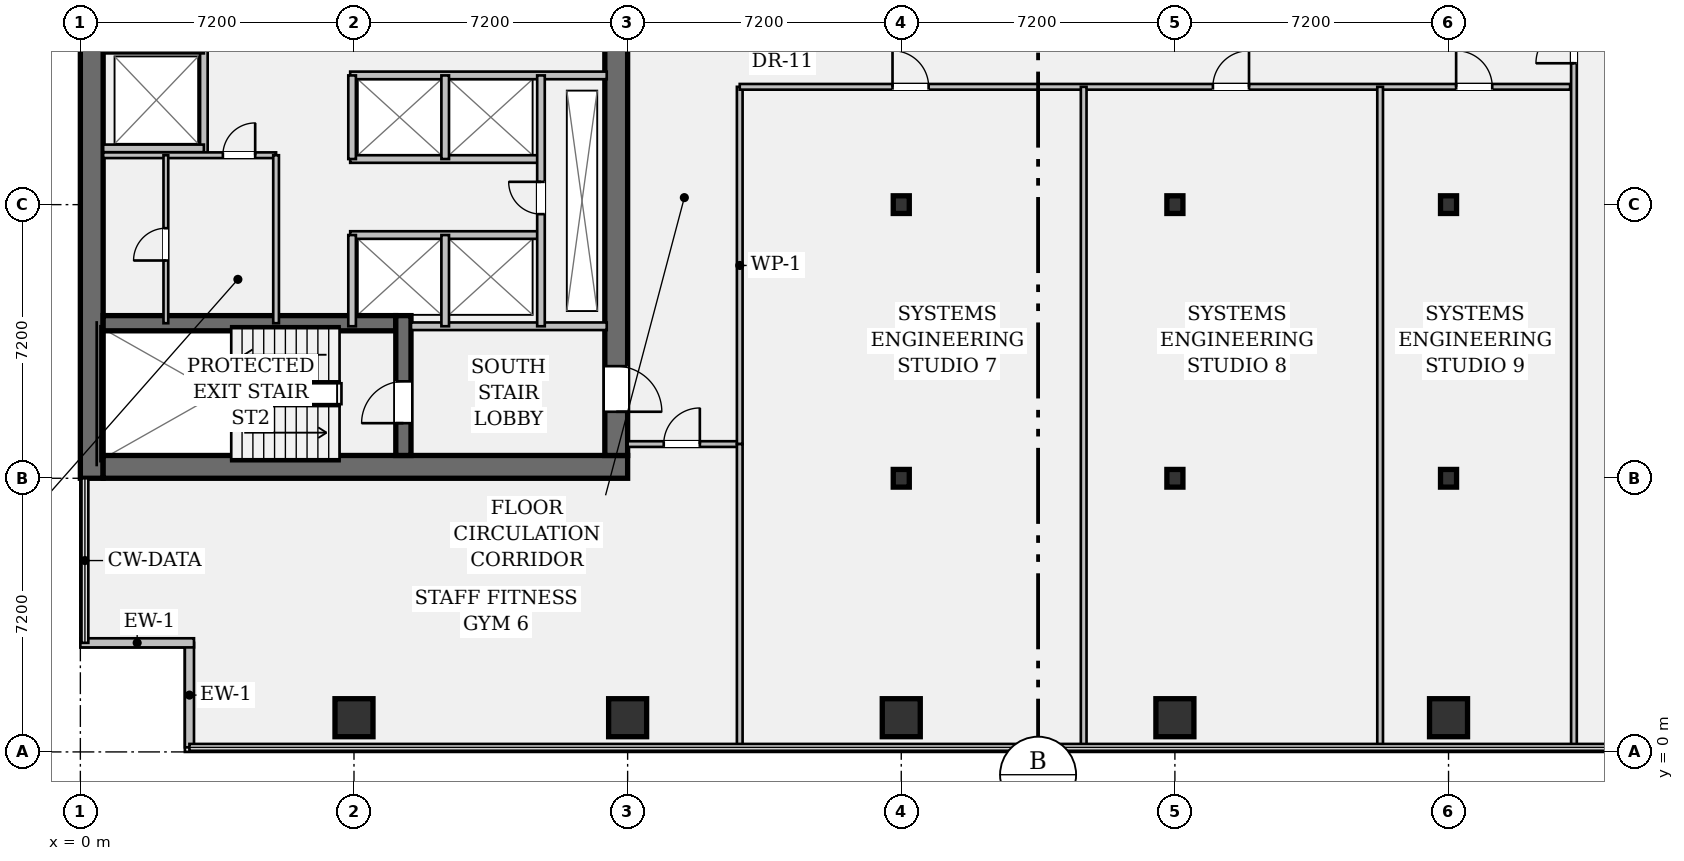
"""IFC4 building model, lengths in metres.
Left out: names, types, materials, properties, quantities, classifications, styles, units other than length and angle.
Written with IfcOpenShell. Run it as: python <this file> out.ifc"""

import sys

from ifc_helpers import new_model, si_unit, direction, frame, frame_2d, origin, origin_2d, place, context, subcontext, project, spatial, rectangle, hollow_rectangle, i_section, extrude, element, fill, save


model = new_model("IFC4")
c1 = context("Model", 3, precision=1e-05, world=origin(), true_north=direction((0.0, 1.0)))
c2 = subcontext(c1, "Body", "Model", "MODEL_VIEW")
j1 = project(units=[si_unit("LENGTHUNIT", "METRE"), si_unit("PLANEANGLEUNIT", "RADIAN")], contexts=[c1])
p1 = place(None, origin())
s1 = spatial("IfcSite", under=j1, at=p1, CompositionType="ELEMENT")
p2 = place(p1, origin())
s2 = spatial("IfcBuilding", under=s1, at=p2, CompositionType="ELEMENT")
p3 = place(p2, frame((0.0, 0.0, 69.65)))
s3 = spatial("IfcBuildingStorey", under=s2, at=p3, CompositionType="ELEMENT", Elevation=69.65)
p4 = place(p3, frame((0.3, 7.2, 0.0), z_axis=(0.0, 0.0, 1.0), x_axis=(0.0, 1.0, 0.0)))
e1 = element("IfcWall", 1, at=p4, inside=s3, PredefinedType="SHEAR", context=c2, shape_type="SweptSolid", body=[
    extrude(rectangle(XDim=28.8, YDim=0.6, at=frame_2d((14.4, 0.0))), origin(), (0.0, 0.0, 1.0), 3.57),
])
p5 = place(p3, frame((0.6, 7.5, 0.0), z_axis=(0.0, 0.0, 1.0), x_axis=(1.0, 0.0, 0.0)))
e2 = element("IfcWall", 2, at=p5, inside=s3, PredefinedType="SHEAR", context=c2, shape_type="SweptSolid", body=[
    extrude(rectangle(XDim=13.8, YDim=0.6, at=frame_2d((6.9, 0.0))), origin(), (0.0, 0.0, 1.0), 3.57),
])
p6 = place(p3, frame((14.1, 35.4, 0.0), z_axis=(0.0, 0.0, 1.0), x_axis=(0.0, -1.0, 0.0)))
e3 = element("IfcWall", 3, at=p6, inside=s3, PredefinedType="SHEAR", context=c2, shape_type="SweptSolid", body=[
    extrude(rectangle(XDim=27.6, YDim=0.6, at=frame_2d((13.8, 0.0))), origin(), (0.0, 0.0, 1.0), 3.57),
])
p7 = place(p6, frame((1.3, 0.0, 0.0)))
e4 = element("IfcOpeningElement", 4, at=p7, cuts=e3, PredefinedType="OPENING", context=c2, shape_type="SweptSolid", body=[
    extrude(rectangle(XDim=1.2, YDim=2.15, at=frame_2d((0.6, 1.075))), frame((0.0, 0.312, 0.0), z_axis=(0.0, -1.0, 0.0), x_axis=(1.0, 0.0, 0.0)), (0.0, 0.0, 1.0), 0.624),
])
p8 = place(p6, frame((25.25, 0.0, 0.0)))
e5 = element("IfcOpeningElement", 5, at=p8, cuts=e3, PredefinedType="OPENING", context=c2, shape_type="SweptSolid", body=[
    extrude(rectangle(XDim=1.2, YDim=2.15, at=frame_2d((0.6, 1.075))), frame((0.0, 0.312, 0.0), z_axis=(0.0, -1.0, 0.0), x_axis=(1.0, 0.0, 0.0)), (0.0, 0.0, 1.0), 0.624),
])
p9 = place(p6, frame((14.6, 0.0, 0.0)))
e6 = element("IfcOpeningElement", 6, at=p9, cuts=e3, PredefinedType="OPENING", context=c2, shape_type="SweptSolid", body=[
    extrude(rectangle(XDim=1.6, YDim=2.2, at=frame_2d((0.8, 1.1))), frame((0.0, 0.312, 0.0), z_axis=(0.0, -1.0, 0.0), x_axis=(1.0, 0.0, 0.0)), (0.0, 0.0, 1.0), 0.624),
])
p10 = place(p3, frame((0.6, 11.28, 0.0), z_axis=(0.0, 0.0, 1.0), x_axis=(1.0, 0.0, 0.0)))
e7 = element("IfcWall", 7, at=p10, inside=s3, PredefinedType="SHEAR", context=c2, shape_type="SweptSolid", body=[
    extrude(rectangle(XDim=7.7, YDim=0.4, at=frame_2d((3.85, 0.0))), origin(), (0.0, 0.0, 1.0), 3.57),
])
p11 = place(p3, frame((8.5, 7.8, 0.0), z_axis=(0.0, 0.0, 1.0), x_axis=(0.0, 1.0, 0.0)))
e8 = element("IfcWall", 8, at=p11, inside=s3, PredefinedType="SHEAR", context=c2, shape_type="SweptSolid", body=[
    extrude(rectangle(XDim=3.68, YDim=0.4, at=frame_2d((1.84, 0.0))), origin(), (0.0, 0.0, 1.0), 3.57),
])
p12 = place(p11, frame((0.85, 0.0, 0.0)))
e9 = element("IfcOpeningElement", 9, at=p12, cuts=e8, PredefinedType="OPENING", context=c2, shape_type="SweptSolid", body=[
    extrude(rectangle(XDim=1.1, YDim=2.15, at=frame_2d((0.55, 1.075))), frame((0.0, 0.212, 0.0), z_axis=(0.0, -1.0, 0.0), x_axis=(1.0, 0.0, 0.0)), (0.0, 0.0, 1.0), 0.424),
])
for number, where, z_axis, x_axis in (
    (10, (7.2, 0.9, 0.0), (0.0, 0.0, 1.0), (1.0, 0.0, 0.0)),
    (11, (14.4, 0.9, 0.0), (0.0, 0.0, 1.0), (1.0, 0.0, 0.0)),
    (12, (21.6, 0.9, 0.0), (0.0, 0.0, 1.0), (1.0, 0.0, 0.0)),
):
    element("IfcColumn", number, at=place(p3, frame(where, z_axis=z_axis, x_axis=x_axis)), inside=s3, PredefinedType="COLUMN", context=c2, shape_type="SweptSolid", body=[
        extrude(hollow_rectangle(XDim=1.0, YDim=1.0, WallThickness=0.065, at=origin_2d()), origin(), (0.0, 0.0, 1.0), 3.57),
    ])
for number, where, z_axis, x_axis in (
    (13, (21.6, 7.2, 0.0), (0.0, 0.0, 1.0), (1.0, 0.0, 0.0)),
    (14, (21.6, 14.4, 0.0), (0.0, 0.0, 1.0), (1.0, 0.0, 0.0)),
):
    element("IfcColumn", number, at=place(p3, frame(where, z_axis=z_axis, x_axis=x_axis)), inside=s3, PredefinedType="COLUMN", context=c2, shape_type="SweptSolid", body=[
        extrude(i_section(OverallWidth=0.422, OverallDepth=0.465, WebThickness=0.045, FlangeThickness=0.073, FilletRadius=0.018, at=origin_2d()), origin(), (0.0, 0.0, 1.0), 3.57),
    ])
p13 = place(p3, frame((28.8, 0.9, 0.0), z_axis=(0.0, 0.0, 1.0), x_axis=(1.0, 0.0, 0.0)))
e15 = element("IfcColumn", 15, at=p13, inside=s3, PredefinedType="COLUMN", context=c2, shape_type="SweptSolid", body=[
    extrude(hollow_rectangle(XDim=1.0, YDim=1.0, WallThickness=0.065, at=origin_2d()), origin(), (0.0, 0.0, 1.0), 3.57),
])
for number, where, z_axis, x_axis in (
    (16, (28.8, 7.2, 0.0), (0.0, 0.0, 1.0), (1.0, 0.0, 0.0)),
    (17, (28.8, 14.4, 0.0), (0.0, 0.0, 1.0), (1.0, 0.0, 0.0)),
):
    element("IfcColumn", number, at=place(p3, frame(where, z_axis=z_axis, x_axis=x_axis)), inside=s3, PredefinedType="COLUMN", context=c2, shape_type="SweptSolid", body=[
        extrude(i_section(OverallWidth=0.422, OverallDepth=0.465, WebThickness=0.045, FlangeThickness=0.073, FilletRadius=0.018, at=origin_2d()), origin(), (0.0, 0.0, 1.0), 3.57),
    ])
p14 = place(p3, frame((36.0, 0.9, 0.0), z_axis=(0.0, 0.0, 1.0), x_axis=(1.0, 0.0, 0.0)))
e18 = element("IfcColumn", 18, at=p14, inside=s3, PredefinedType="COLUMN", context=c2, shape_type="SweptSolid", body=[
    extrude(hollow_rectangle(XDim=1.0, YDim=1.0, WallThickness=0.065, at=origin_2d()), origin(), (0.0, 0.0, 1.0), 3.57),
])
for number, where, z_axis, x_axis in (
    (19, (36.0, 7.2, 0.0), (0.0, 0.0, 1.0), (1.0, 0.0, 0.0)),
    (20, (36.0, 14.4, 0.0), (0.0, 0.0, 1.0), (1.0, 0.0, 0.0)),
):
    element("IfcColumn", number, at=place(p3, frame(where, z_axis=z_axis, x_axis=x_axis)), inside=s3, PredefinedType="COLUMN", context=c2, shape_type="SweptSolid", body=[
        extrude(i_section(OverallWidth=0.422, OverallDepth=0.465, WebThickness=0.045, FlangeThickness=0.073, FilletRadius=0.018, at=origin_2d()), origin(), (0.0, 0.0, 1.0), 3.57),
    ])
p15 = place(p3, frame((2.87, 0.12, 0.0), z_axis=(0.0, 0.0, 1.0), x_axis=(0.0, 1.0, 0.0)))
e21 = element("IfcWall", 21, at=p15, inside=s3, PredefinedType="STANDARD", context=c2, shape_type="SweptSolid", body=[
    extrude(rectangle(XDim=2.75, YDim=0.24, at=frame_2d((1.375, 0.0))), origin(), (0.0, 0.0, 1.0), 3.57),
])
p16 = place(p3, frame((2.99, 2.87, 0.0), z_axis=(0.0, 0.0, 1.0), x_axis=(-1.0, 0.0, 0.0)))
e22 = element("IfcWall", 22, at=p16, inside=s3, PredefinedType="STANDARD", context=c2, shape_type="SweptSolid", body=[
    extrude(rectangle(XDim=2.99, YDim=0.24, at=frame_2d((1.495, 0.0))), origin(), (0.0, 0.0, 1.0), 3.57),
])
p17 = place(p3, frame((8.7, 11.2, 0.0), z_axis=(0.0, 0.0, 1.0), x_axis=(1.0, 0.0, 0.0)))
e23 = element("IfcWall", 23, at=p17, inside=s3, PredefinedType="PARTITIONING", context=c2, shape_type="SweptSolid", body=[
    extrude(rectangle(XDim=5.15, YDim=0.2, at=frame_2d((2.575, 0.0))), origin(), (0.0, 0.0, 1.0), 3.57),
])
p18 = place(p3, frame((3.25, 15.7, 0.0), z_axis=(0.0, 0.0, 1.0), x_axis=(0.0, 1.0, 0.0)))
e24 = element("IfcWall", 24, at=p18, inside=s3, PredefinedType="PARTITIONING", context=c2, shape_type="SweptSolid", body=[
    extrude(rectangle(XDim=13.08, YDim=0.2, at=frame_2d((6.54, 0.0))), origin(), (0.0, 0.0, 1.0), 3.57),
])
for number, where, z_axis, x_axis in (
    (25, (0.6, 15.88, 0.0), (0.0, 0.0, 1.0), (1.0, 0.0, 0.0)),
    (26, (0.6, 18.48, 0.0), (0.0, 0.0, 1.0), (1.0, 0.0, 0.0)),
):
    element("IfcWall", number, at=place(p3, frame(where, z_axis=z_axis, x_axis=x_axis)), inside=s3, PredefinedType="PARTITIONING", context=c2, shape_type="SweptSolid", body=[
        extrude(rectangle(XDim=2.65, YDim=0.2, at=frame_2d((1.325, 0.0))), origin(), (0.0, 0.0, 1.0), 3.57),
    ])
p19 = place(p3, frame((7.1, 17.8, 0.0), z_axis=(0.0, 0.0, 1.0), x_axis=(1.0, 0.0, 0.0)))
e27 = element("IfcWall", 27, at=p19, inside=s3, PredefinedType="PARTITIONING", context=c2, shape_type="SweptSolid", body=[
    extrude(rectangle(XDim=6.75, YDim=0.2, at=frame_2d((3.375, 0.0))), origin(), (0.0, 0.0, 1.0), 3.57),
])
for number, where, z_axis, x_axis in (
    (28, (7.1, 15.6, 0.0), (0.0, 0.0, 1.0), (1.0, 0.0, 0.0)),
    (29, (7.1, 13.6, 0.0), (0.0, 0.0, 1.0), (1.0, 0.0, 0.0)),
):
    element("IfcWall", number, at=place(p3, frame(where, z_axis=z_axis, x_axis=x_axis)), inside=s3, PredefinedType="PARTITIONING", context=c2, shape_type="SweptSolid", body=[
        extrude(rectangle(XDim=5.02, YDim=0.2, at=frame_2d((2.51, 0.0))), origin(), (0.0, 0.0, 1.0), 3.57),
    ])
p20 = place(p3, frame((7.15, 15.6, 0.0), z_axis=(0.0, 0.0, 1.0), x_axis=(0.0, 1.0, 0.0)))
e30 = element("IfcWall", 30, at=p20, inside=s3, PredefinedType="PARTITIONING", context=c2, shape_type="SweptSolid", body=[
    extrude(rectangle(XDim=2.2, YDim=0.2, at=frame_2d((1.1, 0.0))), origin(), (0.0, 0.0, 1.0), 3.57),
])
p21 = place(p3, frame((7.15, 11.2, 0.0), z_axis=(0.0, 0.0, 1.0), x_axis=(0.0, 1.0, 0.0)))
e31 = element("IfcWall", 31, at=p21, inside=s3, PredefinedType="PARTITIONING", context=c2, shape_type="SweptSolid", body=[
    extrude(rectangle(XDim=2.4, YDim=0.2, at=frame_2d((1.2, 0.0))), origin(), (0.0, 0.0, 1.0), 3.57),
])
p22 = place(p3, frame((9.6, 15.6, 0.0), z_axis=(0.0, 0.0, 1.0), x_axis=(0.0, 1.0, 0.0)))
e32 = element("IfcWall", 32, at=p22, inside=s3, PredefinedType="PARTITIONING", context=c2, shape_type="SweptSolid", body=[
    extrude(rectangle(XDim=2.2, YDim=0.2, at=frame_2d((1.1, 0.0))), origin(), (0.0, 0.0, 1.0), 3.57),
])
p23 = place(p3, frame((9.6, 11.2, 0.0), z_axis=(0.0, 0.0, 1.0), x_axis=(0.0, 1.0, 0.0)))
e33 = element("IfcWall", 33, at=p23, inside=s3, PredefinedType="PARTITIONING", context=c2, shape_type="SweptSolid", body=[
    extrude(rectangle(XDim=2.4, YDim=0.2, at=frame_2d((1.2, 0.0))), origin(), (0.0, 0.0, 1.0), 3.57),
])
p24 = place(p3, frame((12.12, 11.2, 0.0), z_axis=(0.0, 0.0, 1.0), x_axis=(0.0, 1.0, 0.0)))
e34 = element("IfcWall", 34, at=p24, inside=s3, PredefinedType="PARTITIONING", context=c2, shape_type="SweptSolid", body=[
    extrude(rectangle(XDim=6.6, YDim=0.2, at=frame_2d((3.3, 0.0))), origin(), (0.0, 0.0, 1.0), 3.57),
])
p25 = place(p24, frame((2.95, 0.0, 0.0)))
e35 = element("IfcOpeningElement", 35, at=p25, cuts=e34, PredefinedType="OPENING", context=c2, shape_type="SweptSolid", body=[
    extrude(rectangle(XDim=0.85, YDim=2.15, at=frame_2d((0.425, 1.075))), frame((0.0, 0.112, 0.0), z_axis=(0.0, -1.0, 0.0), x_axis=(1.0, 0.0, 0.0)), (0.0, 0.0, 1.0), 0.224),
])
p26 = place(p3, frame((0.6, 15.7, 0.0), z_axis=(0.0, 0.0, 1.0), x_axis=(1.0, 0.0, 0.0)))
e36 = element("IfcWall", 36, at=p26, inside=s3, PredefinedType="PARTITIONING", context=c2, shape_type="SweptSolid", body=[
    extrude(rectangle(XDim=4.55, YDim=0.15, at=frame_2d((2.275, 0.0))), origin(), (0.0, 0.0, 1.0), 3.57),
])
p27 = place(p26, frame((3.15, 0.0, 0.0)))
e37 = element("IfcOpeningElement", 37, at=p27, cuts=e36, PredefinedType="OPENING", context=c2, shape_type="SweptSolid", body=[
    extrude(rectangle(XDim=0.85, YDim=2.15, at=frame_2d((0.425, 1.075))), frame((0.0, 0.087, 0.0), z_axis=(0.0, -1.0, 0.0), x_axis=(1.0, 0.0, 0.0)), (0.0, 0.0, 1.0), 0.174),
])
p28 = place(p3, frame((5.15, 11.28, 0.0), z_axis=(0.0, 0.0, 1.0), x_axis=(0.0, 1.0, 0.0)))
e38 = element("IfcWall", 38, at=p28, inside=s3, PredefinedType="PARTITIONING", context=c2, shape_type="SweptSolid", body=[
    extrude(rectangle(XDim=4.42, YDim=0.15, at=frame_2d((2.21, 0.0))), origin(), (0.0, 0.0, 1.0), 3.57),
])
p29 = place(p3, frame((2.25, 11.28, 0.0), z_axis=(0.0, 0.0, 1.0), x_axis=(0.0, 1.0, 0.0)))
e39 = element("IfcWall", 39, at=p29, inside=s3, PredefinedType="PARTITIONING", context=c2, shape_type="SweptSolid", body=[
    extrude(rectangle(XDim=4.42, YDim=0.125, at=frame_2d((2.21, 0.0))), origin(), (0.0, 0.0, 1.0), 3.57),
])
p30 = place(p29, frame((1.65, 0.0, 0.0)))
e40 = element("IfcOpeningElement", 40, at=p30, cuts=e39, PredefinedType="OPENING", context=c2, shape_type="SweptSolid", body=[
    extrude(rectangle(XDim=0.85, YDim=2.15, at=frame_2d((0.425, 1.075))), frame((0.0, 0.074, 0.0), z_axis=(0.0, -1.0, 0.0), x_axis=(1.0, 0.0, 0.0)), (0.0, 0.0, 1.0), 0.149),
])
p31 = place(p3, frame((14.4, 8.1, 0.0), z_axis=(0.0, 0.0, 1.0), x_axis=(1.0, 0.0, 0.0)))
e41 = element("IfcWall", 41, at=p31, inside=s3, PredefinedType="PARTITIONING", context=c2, shape_type="SweptSolid", body=[
    extrude(rectangle(XDim=2.95, YDim=0.15, at=frame_2d((1.475, 0.0))), origin(), (0.0, 0.0, 1.0), 3.088),
])
p32 = place(p31, frame((0.95, 0.0, 0.0)))
e42 = element("IfcOpeningElement", 42, at=p32, cuts=e41, PredefinedType="OPENING", context=c2, shape_type="SweptSolid", body=[
    extrude(rectangle(XDim=0.95, YDim=2.15, at=frame_2d((0.475, 1.075))), frame((0.0, 0.087, 0.0), z_axis=(0.0, -1.0, 0.0), x_axis=(1.0, 0.0, 0.0)), (0.0, 0.0, 1.0), 0.174),
])
p33 = place(p3, frame((17.35, 8.1, 0.0), z_axis=(0.0, 0.0, 1.0), x_axis=(0.0, 1.0, 0.0)))
e43 = element("IfcWall", 43, at=p33, inside=s3, PredefinedType="PARTITIONING", context=c2, shape_type="SweptSolid", body=[
    extrude(rectangle(XDim=9.4, YDim=0.15, at=frame_2d((4.7, 0.0))), origin(), (0.0, 0.0, 1.0), 2.699),
])
p34 = place(p3, frame((17.35, 17.5, 0.0), z_axis=(0.0, 0.0, 1.0), x_axis=(1.0, 0.0, 0.0)))
e44 = element("IfcWall", 44, at=p34, inside=s3, PredefinedType="PARTITIONING", context=c2, shape_type="SweptSolid", body=[
    extrude(rectangle(XDim=21.85, YDim=0.15, at=frame_2d((10.925, 0.0))), origin(), (0.0, 0.0, 1.0), 2.699),
])
p35 = place(p34, frame((4.02, 0.0, 0.0)))
e45 = element("IfcOpeningElement", 45, at=p35, cuts=e44, PredefinedType="OPENING", context=c2, shape_type="SweptSolid", body=[
    extrude(rectangle(XDim=0.95, YDim=2.15, at=frame_2d((0.475, 1.075))), frame((0.0, 0.087, 0.0), z_axis=(0.0, -1.0, 0.0), x_axis=(1.0, 0.0, 0.0)), (0.0, 0.0, 1.0), 0.174),
])
p36 = place(p34, frame((12.45, 0.0, 0.0)))
e46 = element("IfcOpeningElement", 46, at=p36, cuts=e44, PredefinedType="OPENING", context=c2, shape_type="SweptSolid", body=[
    extrude(rectangle(XDim=0.95, YDim=2.15, at=frame_2d((0.475, 1.075))), frame((0.0, 0.087, 0.0), z_axis=(0.0, -1.0, 0.0), x_axis=(1.0, 0.0, 0.0)), (0.0, 0.0, 1.0), 0.174),
])
p37 = place(p34, frame((18.85, 0.0, 0.0)))
e47 = element("IfcOpeningElement", 47, at=p37, cuts=e44, PredefinedType="OPENING", context=c2, shape_type="SweptSolid", body=[
    extrude(rectangle(XDim=0.95, YDim=2.15, at=frame_2d((0.475, 1.075))), frame((0.0, 0.087, 0.0), z_axis=(0.0, -1.0, 0.0), x_axis=(1.0, 0.0, 0.0)), (0.0, 0.0, 1.0), 0.174),
])
p38 = place(p3, frame((39.3, 0.12, 0.0), z_axis=(0.0, 0.0, 1.0), x_axis=(0.0, 1.0, 0.0)))
e48 = element("IfcWall", 48, at=p38, inside=s3, PredefinedType="PARTITIONING", context=c2, shape_type="SweptSolid", body=[
    extrude(rectangle(XDim=24.96, YDim=0.15, at=frame_2d((12.48, 0.0))), origin(), (0.0, 0.0, 1.0), 2.699),
])
p39 = place(p38, frame((18.0, 0.0, 0.0)))
e49 = element("IfcOpeningElement", 49, at=p39, cuts=e48, PredefinedType="OPENING", context=c2, shape_type="SweptSolid", body=[
    extrude(rectangle(XDim=1.0, YDim=2.15, at=frame_2d((0.5, 1.075))), frame((0.0, 0.087, 0.0), z_axis=(0.0, -1.0, 0.0), x_axis=(1.0, 0.0, 0.0)), (0.0, 0.0, 1.0), 0.174),
])
p40 = place(p3, frame((17.35, 0.12, 0.0), z_axis=(0.0, 0.0, 1.0), x_axis=(0.0, 1.0, 0.0)))
e50 = element("IfcWall", 50, at=p40, inside=s3, PredefinedType="PARTITIONING", context=c2, shape_type="SweptSolid", body=[
    extrude(rectangle(XDim=7.98, YDim=0.15, at=frame_2d((3.99, 0.0))), origin(), (0.0, 0.0, 1.0), 2.699),
])
for number, where, z_axis, x_axis in (
    (51, (26.4, 0.12, 0.0), (0.0, 0.0, 1.0), (0.0, 1.0, 0.0)),
    (52, (34.2, 0.12, 0.0), (0.0, 0.0, 1.0), (0.0, 1.0, 0.0)),
):
    element("IfcWall", number, at=place(p3, frame(where, z_axis=z_axis, x_axis=x_axis)), inside=s3, PredefinedType="PARTITIONING", context=c2, shape_type="SweptSolid", body=[
        extrude(rectangle(XDim=17.38, YDim=0.15, at=frame_2d((8.69, 0.0))), origin(), (0.0, 0.0, 1.0), 2.699),
    ])
p41 = place(p12, origin())
e53 = element("IfcDoor", 53, at=p41, inside=s3, OperationType="SINGLE_SWING_LEFT", PredefinedType="DOOR", context=c2, shape_type="SweptSolid", body=[
    extrude(rectangle(XDim=1.1, YDim=2.15, at=frame_2d((0.55, 1.075))), frame((0.0, 0.025, 0.0), z_axis=(0.0, -1.0, 0.0), x_axis=(1.0, 0.0, 0.0)), (0.0, 0.0, 1.0), 0.05),
])
fill(e9, e53)
p42 = place(p8, origin())
e54 = element("IfcDoor", 54, at=p42, inside=s3, OperationType="SINGLE_SWING_RIGHT", PredefinedType="DOOR", context=c2, shape_type="SweptSolid", body=[
    extrude(rectangle(XDim=1.2, YDim=2.15, at=frame_2d((0.6, 1.075))), frame((0.0, 0.025, 0.0), z_axis=(0.0, -1.0, 0.0), x_axis=(1.0, 0.0, 0.0)), (0.0, 0.0, 1.0), 0.05),
])
fill(e5, e54)
p43 = place(p25, origin())
e55 = element("IfcDoor", 55, at=p43, inside=s3, OperationType="SINGLE_SWING_RIGHT", PredefinedType="DOOR", context=c2, shape_type="SweptSolid", body=[
    extrude(rectangle(XDim=0.85, YDim=2.15, at=frame_2d((0.425, 1.075))), frame((0.0, 0.025, 0.0), z_axis=(0.0, -1.0, 0.0), x_axis=(1.0, 0.0, 0.0)), (0.0, 0.0, 1.0), 0.05),
])
fill(e35, e55)
p44 = place(p27, origin())
e56 = element("IfcDoor", 56, at=p44, inside=s3, OperationType="SINGLE_SWING_RIGHT", PredefinedType="DOOR", context=c2, shape_type="SweptSolid", body=[
    extrude(rectangle(XDim=0.85, YDim=2.15, at=frame_2d((0.425, 1.075))), frame((0.0, 0.025, 0.0), z_axis=(0.0, -1.0, 0.0), x_axis=(1.0, 0.0, 0.0)), (0.0, 0.0, 1.0), 0.05),
])
fill(e37, e56)
p45 = place(p30, origin())
e57 = element("IfcDoor", 57, at=p45, inside=s3, OperationType="SINGLE_SWING_LEFT", PredefinedType="DOOR", context=c2, shape_type="SweptSolid", body=[
    extrude(rectangle(XDim=0.85, YDim=2.15, at=frame_2d((0.425, 1.075))), frame((0.0, 0.025, 0.0), z_axis=(0.0, -1.0, 0.0), x_axis=(1.0, 0.0, 0.0)), (0.0, 0.0, 1.0), 0.05),
])
fill(e40, e57)
p46 = place(p32, origin())
e58 = element("IfcDoor", 58, at=p46, inside=s3, OperationType="SINGLE_SWING_RIGHT", PredefinedType="DOOR", context=c2, shape_type="SweptSolid", body=[
    extrude(rectangle(XDim=0.95, YDim=2.15, at=frame_2d((0.475, 1.075))), frame((0.0, 0.025, 0.0), z_axis=(0.0, -1.0, 0.0), x_axis=(1.0, 0.0, 0.0)), (0.0, 0.0, 1.0), 0.05),
])
fill(e42, e58)
p47 = place(p35, origin())
e59 = element("IfcDoor", 59, at=p47, inside=s3, OperationType="SINGLE_SWING_LEFT", PredefinedType="DOOR", context=c2, shape_type="SweptSolid", body=[
    extrude(rectangle(XDim=0.95, YDim=2.15, at=frame_2d((0.475, 1.075))), frame((0.0, 0.025, 0.0), z_axis=(0.0, -1.0, 0.0), x_axis=(1.0, 0.0, 0.0)), (0.0, 0.0, 1.0), 0.05),
])
fill(e45, e59)
p48 = place(p36, origin())
e60 = element("IfcDoor", 60, at=p48, inside=s3, OperationType="SINGLE_SWING_RIGHT", PredefinedType="DOOR", context=c2, shape_type="SweptSolid", body=[
    extrude(rectangle(XDim=0.95, YDim=2.15, at=frame_2d((0.475, 1.075))), frame((0.0, 0.025, 0.0), z_axis=(0.0, -1.0, 0.0), x_axis=(1.0, 0.0, 0.0)), (0.0, 0.0, 1.0), 0.05),
])
fill(e46, e60)
p49 = place(p37, origin())
e61 = element("IfcDoor", 61, at=p49, inside=s3, OperationType="SINGLE_SWING_LEFT", PredefinedType="DOOR", context=c2, shape_type="SweptSolid", body=[
    extrude(rectangle(XDim=0.95, YDim=2.15, at=frame_2d((0.475, 1.075))), frame((0.0, 0.025, 0.0), z_axis=(0.0, -1.0, 0.0), x_axis=(1.0, 0.0, 0.0)), (0.0, 0.0, 1.0), 0.05),
])
fill(e47, e61)
p50 = place(p39, origin())
e62 = element("IfcDoor", 62, at=p50, inside=s3, OperationType="SINGLE_SWING_LEFT", PredefinedType="DOOR", context=c2, shape_type="SweptSolid", body=[
    extrude(rectangle(XDim=1.0, YDim=2.15, at=frame_2d((0.5, 1.075))), frame((0.0, 0.025, 0.0), z_axis=(0.0, -1.0, 0.0), x_axis=(1.0, 0.0, 0.0)), (0.0, 0.0, 1.0), 0.05),
])
fill(e49, e62)
save(model, sys.argv[1])
